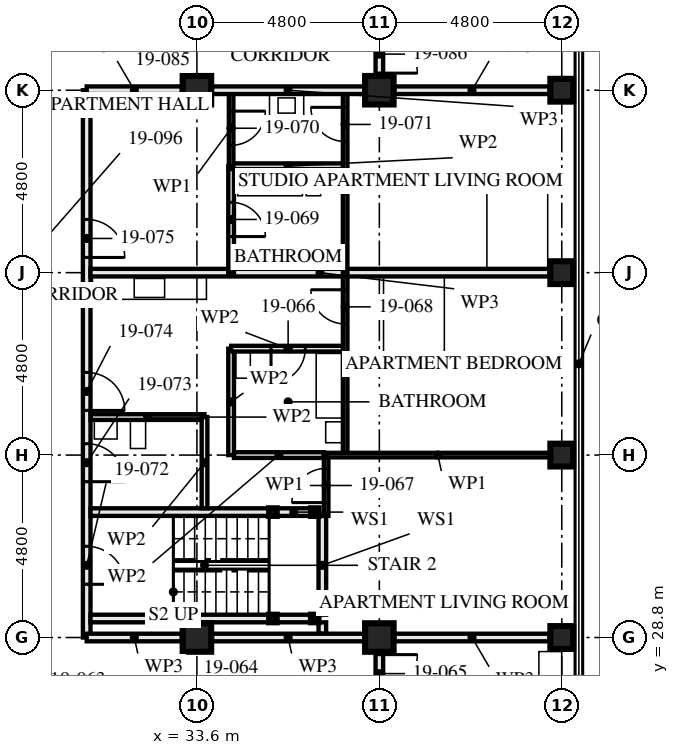
"""IFC4 building model, lengths in metres.
Left out: names, types, materials, properties, quantities, classifications, styles, units other than length and angle.
Written with IfcOpenShell. Run it as: python <this file> out.ifc"""

import sys

from ifc_helpers import new_model, si_unit, direction, frame, frame_2d, origin, origin_2d, place, context, subcontext, project, spatial, rectangle, hollow_rectangle, extrude, element, fill, save


model = new_model("IFC4")
c1 = context("Model", 3, precision=1e-05, world=origin(), true_north=direction((0.0, 1.0)))
c2 = subcontext(c1, "Body", "Model", "MODEL_VIEW")
j1 = project(units=[si_unit("LENGTHUNIT", "METRE"), si_unit("PLANEANGLEUNIT", "RADIAN")], contexts=[c1])
p1 = place(None, origin())
s1 = spatial("IfcSite", under=j1, at=p1, CompositionType="ELEMENT")
p2 = place(p1, origin())
s2 = spatial("IfcBuilding", under=s1, at=p2, CompositionType="ELEMENT")
p3 = place(p2, frame((0.0, 0.0, 72.5)))
s3 = spatial("IfcBuildingStorey", under=s2, at=p3, CompositionType="ELEMENT", Elevation=72.5)
for number, where, z_axis, x_axis in (
    (1, (33.6, 28.8, 0.0), (0.0, 0.0, 1.0), (0.0, 1.0, 0.0)),
    (2, (33.6, 43.2, 0.0), (0.0, 0.0, 1.0), (0.0, 1.0, 0.0)),
    (3, (38.4, 28.8, 0.0), (0.0, 0.0, 1.0), (0.0, 1.0, 0.0)),
    (4, (38.4, 43.2, 0.0), (0.0, 0.0, 1.0), (0.0, 1.0, 0.0)),
):
    element("IfcColumn", number, at=place(p3, frame(where, z_axis=z_axis, x_axis=x_axis)), inside=s3, PredefinedType="COLUMN", context=c2, shape_type="SweptSolid", body=[
        extrude(hollow_rectangle(XDim=0.75, YDim=0.75, WallThickness=0.08, at=origin_2d()), origin(), (0.0, 0.0, 1.0), 3.5),
    ])
for number, where, z_axis, x_axis in (
    (5, (43.2, 28.8, 0.0), (0.0, 0.0, 1.0), (0.0, 1.0, 0.0)),
    (6, (43.2, 33.6, 0.0), (0.0, 0.0, 1.0), (1.0, 0.0, 0.0)),
    (7, (43.2, 38.4, 0.0), (0.0, 0.0, 1.0), (1.0, 0.0, 0.0)),
    (8, (43.2, 43.2, 0.0), (0.0, 0.0, 1.0), (0.0, 1.0, 0.0)),
):
    element("IfcColumn", number, at=place(p3, frame(where, z_axis=z_axis, x_axis=x_axis)), inside=s3, PredefinedType="COLUMN", context=c2, shape_type="SweptSolid", body=[
        extrude(hollow_rectangle(XDim=0.6, YDim=0.6, WallThickness=0.08, at=origin_2d()), origin(), (0.0, 0.0, 1.0), 3.5),
    ])
for number, where, z_axis, x_axis in (
    (9, (36.7, 29.3, 0.0), (0.0, 0.0, 1.0), (1.0, 0.0, 0.0)),
    (10, (36.7, 32.1, 0.0), (0.0, 0.0, 1.0), (1.0, 0.0, 0.0)),
    (11, (35.6, 29.3, 0.0), (0.0, 0.0, 1.0), (1.0, 0.0, 0.0)),
    (12, (35.6, 32.1, 0.0), (0.0, 0.0, 1.0), (1.0, 0.0, 0.0)),
):
    element("IfcColumn", number, at=place(p3, frame(where, z_axis=z_axis, x_axis=x_axis)), inside=s3, PredefinedType="COLUMN", context=c2, shape_type="SweptSolid", body=[
        extrude(hollow_rectangle(XDim=0.2, YDim=0.2, WallThickness=0.008, at=origin_2d()), origin(), (0.0, 0.0, 1.0), 3.33),
    ])
p4 = place(p3, frame((38.4, 26.8, 0.0), z_axis=(0.0, 0.0, 1.0), x_axis=(0.0, 1.0, 0.0)))
e13 = element("IfcWall", 13, at=p4, inside=s3, PredefinedType="PARTITIONING", context=c2, shape_type="SweptSolid", body=[
    extrude(rectangle(XDim=1.605, YDim=0.2, at=frame_2d((0.802, 0.0))), origin(), (0.0, 0.0, 1.0), 3.33),
])
p5 = place(p4, frame((0.55, 0.0, 0.0)))
e14 = element("IfcOpeningElement", 14, at=p5, cuts=e13, PredefinedType="OPENING", context=c2, shape_type="SweptSolid", body=[
    extrude(rectangle(XDim=1.0, YDim=2.1, at=frame_2d((0.5, 1.05))), frame((0.0, 0.111, 0.0), z_axis=(0.0, -1.0, 0.0), x_axis=(1.0, 0.0, 0.0)), (0.0, 0.0, 1.0), 0.221),
])
p6 = place(p3, frame((36.6, 29.3, 0.0), z_axis=(0.0, 0.0, 1.0), x_axis=(-1.0, 0.0, 0.0)))
e15 = element("IfcWall", 15, at=p6, inside=s3, PredefinedType="SOLIDWALL", context=c2, shape_type="SweptSolid", body=[
    extrude(rectangle(XDim=0.9, YDim=0.2, at=frame_2d((0.45, 0.0))), origin(), (0.0, 0.0, 1.0), 2.99),
])
p7 = place(p3, frame((35.5, 29.3, 0.0), z_axis=(0.0, 0.0, 1.0), x_axis=(-1.0, 0.0, 0.0)))
e16 = element("IfcWall", 16, at=p7, inside=s3, PredefinedType="SOLIDWALL", context=c2, shape_type="SweptSolid", body=[
    extrude(rectangle(XDim=4.7, YDim=0.2, at=frame_2d((2.35, 0.0))), origin(), (0.0, 0.0, 1.0), 2.99),
])
p8 = place(p3, frame((36.6, 32.1, 0.0), z_axis=(0.0, 0.0, 1.0), x_axis=(-1.0, 0.0, 0.0)))
e17 = element("IfcWall", 17, at=p8, inside=s3, PredefinedType="SOLIDWALL", context=c2, shape_type="SweptSolid", body=[
    extrude(rectangle(XDim=0.9, YDim=0.2, at=frame_2d((0.45, 0.0))), origin(), (0.0, 0.0, 1.0), 2.99),
])
p9 = place(p3, frame((35.5, 32.1, 0.0), z_axis=(0.0, 0.0, 1.0), x_axis=(-1.0, 0.0, 0.0)))
e18 = element("IfcWall", 18, at=p9, inside=s3, PredefinedType="SOLIDWALL", context=c2, shape_type="SweptSolid", body=[
    extrude(rectangle(XDim=4.7, YDim=0.2, at=frame_2d((2.35, 0.0))), origin(), (0.0, 0.0, 1.0), 2.99),
])
p10 = place(p3, frame((36.9, 28.9, 0.0), z_axis=(0.0, 0.0, 1.0), x_axis=(0.0, 1.0, 0.0)))
e19 = element("IfcWall", 19, at=p10, inside=s3, PredefinedType="SOLIDWALL", context=c2, shape_type="SweptSolid", body=[
    extrude(rectangle(XDim=0.3, YDim=0.2, at=frame_2d((0.15, 0.0))), origin(), (0.0, 0.0, 1.0), 3.33),
])
p11 = place(p3, frame((36.9, 29.4, 0.0), z_axis=(0.0, 0.0, 1.0), x_axis=(0.0, 1.0, 0.0)))
e20 = element("IfcWall", 20, at=p11, inside=s3, PredefinedType="SOLIDWALL", context=c2, shape_type="SweptSolid", body=[
    extrude(rectangle(XDim=2.6, YDim=0.2, at=frame_2d((1.3, 0.0))), origin(), (0.0, 0.0, 1.0), 3.33),
])
p12 = place(p3, frame((33.8, 32.2, 0.0), z_axis=(0.0, 0.0, 1.0), x_axis=(0.0, 1.0, 0.0)))
e21 = element("IfcWall", 21, at=p12, inside=s3, PredefinedType="PARTITIONING", context=c2, shape_type="SweptSolid", body=[
    extrude(rectangle(XDim=2.4, YDim=0.15, at=frame_2d((1.2, 0.0))), origin(), (0.0, 0.0, 1.0), 2.55),
])
p13 = place(p3, frame((33.8, 34.6, 0.0), z_axis=(0.0, 0.0, 1.0), x_axis=(-1.0, 0.0, 0.0)))
e22 = element("IfcWall", 22, at=p13, inside=s3, PredefinedType="PARTITIONING", context=c2, shape_type="SweptSolid", body=[
    extrude(rectangle(XDim=3.0, YDim=0.15, at=frame_2d((1.5, 0.0))), origin(), (0.0, 0.0, 1.0), 3.33),
])
p14 = place(p3, frame((37.5, 36.4, 0.0), z_axis=(0.0, 0.0, 1.0), x_axis=(-1.0, 0.0, 0.0)))
e23 = element("IfcWall", 23, at=p14, inside=s3, PredefinedType="PARTITIONING", context=c2, shape_type="SweptSolid", body=[
    extrude(rectangle(XDim=3.0, YDim=0.15, at=frame_2d((1.5, 0.0))), origin(), (0.0, 0.0, 1.0), 3.33),
])
p15 = place(p14, frame((1.05, 0.0, 0.0)))
e24 = element("IfcOpeningElement", 24, at=p15, cuts=e23, PredefinedType="OPENING", context=c2, shape_type="SweptSolid", body=[
    extrude(rectangle(XDim=0.9, YDim=2.1, at=frame_2d((0.45, 1.05))), frame((0.0, 0.085, 0.0), z_axis=(0.0, -1.0, 0.0), x_axis=(1.0, 0.0, 0.0)), (0.0, 0.0, 1.0), 0.171),
])
p16 = place(p3, frame((34.5, 33.6, 0.0), z_axis=(0.0, 0.0, 1.0), x_axis=(0.0, 1.0, 0.0)))
e25 = element("IfcWall", 25, at=p16, inside=s3, PredefinedType="PARTITIONING", context=c2, shape_type="SweptSolid", body=[
    extrude(rectangle(XDim=2.8, YDim=0.15, at=frame_2d((1.4, 0.0))), origin(), (0.0, 0.0, 1.0), 3.33),
])
p17 = place(p3, frame((37.0, 32.0, 0.0), z_axis=(0.0, 0.0, 1.0), x_axis=(0.0, 1.0, 0.0)))
e26 = element("IfcWall", 26, at=p17, inside=s3, PredefinedType="PARTITIONING", context=c2, shape_type="SweptSolid", body=[
    extrude(rectangle(XDim=1.6, YDim=0.12, at=frame_2d((0.8, 0.0))), origin(), (0.0, 0.0, 1.0), 3.33),
])
p18 = place(p17, frame((0.35, 0.0, 0.0)))
e27 = element("IfcOpeningElement", 27, at=p18, cuts=e26, PredefinedType="OPENING", context=c2, shape_type="SweptSolid", body=[
    extrude(rectangle(XDim=0.9, YDim=2.1, at=frame_2d((0.45, 1.05))), frame((0.0, 0.071, 0.0), z_axis=(0.0, -1.0, 0.0), x_axis=(1.0, 0.0, 0.0)), (0.0, 0.0, 1.0), 0.141),
])
p19 = place(p3, frame((37.5, 33.6, 0.0), z_axis=(0.0, 0.0, 1.0), x_axis=(0.0, 1.0, 0.0)))
e28 = element("IfcWall", 28, at=p19, inside=s3, PredefinedType="PARTITIONING", context=c2, shape_type="SweptSolid", body=[
    extrude(rectangle(XDim=4.8, YDim=0.12, at=frame_2d((2.4, 0.0))), origin(), (0.0, 0.0, 1.0), 3.33),
])
p20 = place(p19, frame((3.45, 0.0, 0.0)))
e29 = element("IfcOpeningElement", 29, at=p20, cuts=e28, PredefinedType="OPENING", context=c2, shape_type="SweptSolid", body=[
    extrude(rectangle(XDim=0.9, YDim=2.1, at=frame_2d((0.45, 1.05))), frame((0.0, 0.071, 0.0), z_axis=(0.0, -1.0, 0.0), x_axis=(1.0, 0.0, 0.0)), (0.0, 0.0, 1.0), 0.141),
])
p21 = place(p3, frame((42.88, 33.6, 0.0), z_axis=(0.0, 0.0, 1.0), x_axis=(-1.0, 0.0, 0.0)))
e30 = element("IfcWall", 30, at=p21, inside=s3, PredefinedType="PARTITIONING", context=c2, shape_type="SweptSolid", body=[
    extrude(rectangle(XDim=5.88, YDim=0.12, at=frame_2d((2.94, 0.0))), origin(), (0.0, 0.0, 1.0), 2.55),
])
p22 = place(p3, frame((42.88, 38.4, 0.0), z_axis=(0.0, 0.0, 1.0), x_axis=(-1.0, 0.0, 0.0)))
e31 = element("IfcWall", 31, at=p22, inside=s3, PredefinedType="PARTITIONING", context=c2, shape_type="SweptSolid", body=[
    extrude(rectangle(XDim=12.08, YDim=0.2, at=frame_2d((6.04, 0.0))), origin(), (0.0, 0.0, 1.0), 2.55),
])
p23 = place(p3, frame((37.5, 41.2, 0.0), z_axis=(0.0, 0.0, 1.0), x_axis=(-1.0, 0.0, 0.0)))
e32 = element("IfcWall", 32, at=p23, inside=s3, PredefinedType="PARTITIONING", context=c2, shape_type="SweptSolid", body=[
    extrude(rectangle(XDim=3.0, YDim=0.15, at=frame_2d((1.5, 0.0))), origin(), (0.0, 0.0, 1.0), 3.33),
])
p24 = place(p3, frame((34.5, 38.4, 0.0), z_axis=(0.0, 0.0, 1.0), x_axis=(0.0, 1.0, 0.0)))
e33 = element("IfcWall", 33, at=p24, inside=s3, PredefinedType="PARTITIONING", context=c2, shape_type="SweptSolid", body=[
    extrude(rectangle(XDim=2.8, YDim=0.15, at=frame_2d((1.4, 0.0))), origin(), (0.0, 0.0, 1.0), 3.33),
])
p25 = place(p24, frame((0.95, 0.0, 0.0)))
e34 = element("IfcOpeningElement", 34, at=p25, cuts=e33, PredefinedType="OPENING", context=c2, shape_type="SweptSolid", body=[
    extrude(rectangle(XDim=0.9, YDim=2.1, at=frame_2d((0.45, 1.05))), frame((0.0, 0.085, 0.0), z_axis=(0.0, -1.0, 0.0), x_axis=(1.0, 0.0, 0.0)), (0.0, 0.0, 1.0), 0.171),
])
p26 = place(p3, frame((34.5, 41.2, 0.0), z_axis=(0.0, 0.0, 1.0), x_axis=(0.0, 1.0, 0.0)))
e35 = element("IfcWall", 35, at=p26, inside=s3, PredefinedType="PARTITIONING", context=c2, shape_type="SweptSolid", body=[
    extrude(rectangle(XDim=2.0, YDim=0.12, at=frame_2d((1.0, 0.0))), origin(), (0.0, 0.0, 1.0), 3.33),
])
p27 = place(p26, frame((0.55, 0.0, 0.0)))
e36 = element("IfcOpeningElement", 36, at=p27, cuts=e35, PredefinedType="OPENING", context=c2, shape_type="SweptSolid", body=[
    extrude(rectangle(XDim=0.9, YDim=2.1, at=frame_2d((0.45, 1.05))), frame((0.0, 0.071, 0.0), z_axis=(0.0, -1.0, 0.0), x_axis=(1.0, 0.0, 0.0)), (0.0, 0.0, 1.0), 0.141),
])
p28 = place(p3, frame((37.5, 38.4, 0.0), z_axis=(0.0, 0.0, 1.0), x_axis=(0.0, 1.0, 0.0)))
e37 = element("IfcWall", 37, at=p28, inside=s3, PredefinedType="PARTITIONING", context=c2, shape_type="SweptSolid", body=[
    extrude(rectangle(XDim=4.8, YDim=0.12, at=frame_2d((2.4, 0.0))), origin(), (0.0, 0.0, 1.0), 3.33),
])
p29 = place(p28, frame((3.45, 0.0, 0.0)))
e38 = element("IfcOpeningElement", 38, at=p29, cuts=e37, PredefinedType="OPENING", context=c2, shape_type="SweptSolid", body=[
    extrude(rectangle(XDim=0.9, YDim=2.1, at=frame_2d((0.45, 1.05))), frame((0.0, 0.071, 0.0), z_axis=(0.0, -1.0, 0.0), x_axis=(1.0, 0.0, 0.0)), (0.0, 0.0, 1.0), 0.141),
])
p30 = place(p3, frame((30.7, 28.8, 0.0), z_axis=(0.0, 0.0, 1.0), x_axis=(0.0, 1.0, 0.0)))
e39 = element("IfcWall", 39, at=p30, inside=s3, PredefinedType="PARTITIONING", context=c2, shape_type="SweptSolid", body=[
    extrude(rectangle(XDim=14.4, YDim=0.2, at=frame_2d((7.2, 0.0))), origin(), (0.0, 0.0, 1.0), 2.55),
])
p31 = place(p30, frame((1.4, 0.0, 0.0)))
e40 = element("IfcOpeningElement", 40, at=p31, cuts=e39, PredefinedType="OPENING", context=c2, shape_type="SweptSolid", body=[
    extrude(rectangle(XDim=1.0, YDim=2.1, at=frame_2d((0.5, 1.05))), frame((0.0, 0.111, 0.0), z_axis=(0.0, -1.0, 0.0), x_axis=(1.0, 0.0, 0.0)), (0.0, 0.0, 1.0), 0.221),
])
p32 = place(p30, frame((4.1, 0.0, 0.0)))
e41 = element("IfcOpeningElement", 41, at=p32, cuts=e39, PredefinedType="OPENING", context=c2, shape_type="SweptSolid", body=[
    extrude(rectangle(XDim=1.0, YDim=2.1, at=frame_2d((0.5, 1.05))), frame((0.0, 0.111, 0.0), z_axis=(0.0, -1.0, 0.0), x_axis=(1.0, 0.0, 0.0)), (0.0, 0.0, 1.0), 0.221),
])
p33 = place(p30, frame((5.975, 0.0, 0.0)))
e42 = element("IfcOpeningElement", 42, at=p33, cuts=e39, PredefinedType="OPENING", context=c2, shape_type="SweptSolid", body=[
    extrude(rectangle(XDim=1.0, YDim=2.1, at=frame_2d((0.5, 1.05))), frame((0.0, 0.111, 0.0), z_axis=(0.0, -1.0, 0.0), x_axis=(1.0, 0.0, 0.0)), (0.0, 0.0, 1.0), 0.221),
])
p34 = place(p30, frame((10.0, 0.0, 0.0)))
e43 = element("IfcOpeningElement", 43, at=p34, cuts=e39, PredefinedType="OPENING", context=c2, shape_type="SweptSolid", body=[
    extrude(rectangle(XDim=1.0, YDim=2.1, at=frame_2d((0.5, 1.05))), frame((0.0, 0.111, 0.0), z_axis=(0.0, -1.0, 0.0), x_axis=(1.0, 0.0, 0.0)), (0.0, 0.0, 1.0), 0.221),
])
p35 = place(p3, frame((38.4, 45.2, 0.0), z_axis=(0.0, 0.0, 1.0), x_axis=(0.0, -1.0, 0.0)))
e44 = element("IfcWall", 44, at=p35, inside=s3, PredefinedType="PARTITIONING", context=c2, shape_type="SweptSolid", body=[
    extrude(rectangle(XDim=1.605, YDim=0.2, at=frame_2d((0.802, 0.0))), origin(), (0.0, 0.0, 1.0), 3.33),
])
p36 = place(p35, frame((0.55, 0.0, 0.0)))
e45 = element("IfcOpeningElement", 45, at=p36, cuts=e44, PredefinedType="OPENING", context=c2, shape_type="SweptSolid", body=[
    extrude(rectangle(XDim=1.0, YDim=2.1, at=frame_2d((0.5, 1.05))), frame((0.0, 0.111, 0.0), z_axis=(0.0, -1.0, 0.0), x_axis=(1.0, 0.0, 0.0)), (0.0, 0.0, 1.0), 0.221),
])
p37 = place(p3, frame((42.88, 28.8, 0.0), z_axis=(0.0, 0.0, 1.0), x_axis=(-1.0, 0.0, 0.0)))
e46 = element("IfcWall", 46, at=p37, inside=s3, PredefinedType="PARTITIONING", context=c2, shape_type="SweptSolid", body=[
    extrude(rectangle(XDim=4.085, YDim=0.2, at=frame_2d((2.042, 0.0))), origin(), (0.0, 0.0, 1.0), 2.32),
])
p38 = place(p3, frame((38.005, 28.8, 0.0), z_axis=(0.0, 0.0, 1.0), x_axis=(-1.0, 0.0, 0.0)))
e47 = element("IfcWall", 47, at=p38, inside=s3, PredefinedType="PARTITIONING", context=c2, shape_type="SweptSolid", body=[
    extrude(rectangle(XDim=4.01, YDim=0.2, at=frame_2d((2.005, 0.0))), origin(), (0.0, 0.0, 1.0), 2.32),
])
p39 = place(p3, frame((33.205, 28.8, 0.0), z_axis=(0.0, 0.0, 1.0), x_axis=(-1.0, 0.0, 0.0)))
e48 = element("IfcWall", 48, at=p39, inside=s3, PredefinedType="PARTITIONING", context=c2, shape_type="SweptSolid", body=[
    extrude(rectangle(XDim=2.505, YDim=0.2, at=frame_2d((1.252, 0.0))), origin(), (0.0, 0.0, 1.0), 2.32),
])
p40 = place(p3, frame((42.88, 43.2, 0.0), z_axis=(0.0, 0.0, 1.0), x_axis=(-1.0, 0.0, 0.0)))
e49 = element("IfcWall", 49, at=p40, inside=s3, PredefinedType="PARTITIONING", context=c2, shape_type="SweptSolid", body=[
    extrude(rectangle(XDim=4.085, YDim=0.2, at=frame_2d((2.042, 0.0))), origin(), (0.0, 0.0, 1.0), 2.32),
])
p41 = place(p3, frame((38.005, 43.2, 0.0), z_axis=(0.0, 0.0, 1.0), x_axis=(-1.0, 0.0, 0.0)))
e50 = element("IfcWall", 50, at=p41, inside=s3, PredefinedType="PARTITIONING", context=c2, shape_type="SweptSolid", body=[
    extrude(rectangle(XDim=4.01, YDim=0.2, at=frame_2d((2.005, 0.0))), origin(), (0.0, 0.0, 1.0), 2.32),
])
p42 = place(p3, frame((33.205, 43.2, 0.0), z_axis=(0.0, 0.0, 1.0), x_axis=(-1.0, 0.0, 0.0)))
e51 = element("IfcWall", 51, at=p42, inside=s3, PredefinedType="PARTITIONING", context=c2, shape_type="SweptSolid", body=[
    extrude(rectangle(XDim=2.505, YDim=0.2, at=frame_2d((1.252, 0.0))), origin(), (0.0, 0.0, 1.0), 2.32),
])
p43 = place(p3, frame((36.94, 33.6, 0.0), z_axis=(0.0, 0.0, 1.0), x_axis=(-1.0, 0.0, 0.0)))
e52 = element("IfcWall", 52, at=p43, inside=s3, PredefinedType="PARTITIONING", context=c2, shape_type="SweptSolid", body=[
    extrude(rectangle(XDim=2.365, YDim=0.15, at=frame_2d((1.183, 0.0))), origin(), (0.0, 0.0, 1.0), 2.55),
])
p44 = place(p5, frame((1.0, 0.0, 0.0), z_axis=(0.0, 0.0, 1.0), x_axis=(-1.0, 0.0, 0.0)))
e53 = element("IfcDoor", 53, at=p44, inside=s3, OperationType="SINGLE_SWING_RIGHT", PredefinedType="DOOR", context=c2, shape_type="SweptSolid", body=[
    extrude(rectangle(XDim=1.0, YDim=2.1, at=frame_2d((0.5, 1.05))), frame((0.0, 0.027, 0.0), z_axis=(0.0, -1.0, 0.0), x_axis=(1.0, 0.0, 0.0)), (0.0, 0.0, 1.0), 0.054),
])
fill(e14, e53)
p45 = place(p15, origin())
e54 = element("IfcDoor", 54, at=p45, inside=s3, OperationType="SINGLE_SWING_LEFT", PredefinedType="DOOR", context=c2, shape_type="SweptSolid", body=[
    extrude(rectangle(XDim=0.9, YDim=2.1, at=frame_2d((0.45, 1.05))), frame((0.0, 0.022, 0.0), z_axis=(0.0, -1.0, 0.0), x_axis=(1.0, 0.0, 0.0)), (0.0, 0.0, 1.0), 0.044),
])
fill(e24, e54)
p46 = place(p18, origin())
e55 = element("IfcDoor", 55, at=p46, inside=s3, OperationType="SINGLE_SWING_RIGHT", PredefinedType="DOOR", context=c2, shape_type="SweptSolid", body=[
    extrude(rectangle(XDim=0.9, YDim=2.1, at=frame_2d((0.45, 1.05))), frame((0.0, 0.022, 0.0), z_axis=(0.0, -1.0, 0.0), x_axis=(1.0, 0.0, 0.0)), (0.0, 0.0, 1.0), 0.044),
])
fill(e27, e55)
p47 = place(p20, origin())
e56 = element("IfcDoor", 56, at=p47, inside=s3, OperationType="SINGLE_SWING_LEFT", PredefinedType="DOOR", context=c2, shape_type="SweptSolid", body=[
    extrude(rectangle(XDim=0.9, YDim=2.1, at=frame_2d((0.45, 1.05))), frame((0.0, 0.022, 0.0), z_axis=(0.0, -1.0, 0.0), x_axis=(1.0, 0.0, 0.0)), (0.0, 0.0, 1.0), 0.044),
])
fill(e29, e56)
p48 = place(p25, frame((0.9, 0.0, 0.0), z_axis=(0.0, 0.0, 1.0), x_axis=(-1.0, 0.0, 0.0)))
e57 = element("IfcDoor", 57, at=p48, inside=s3, OperationType="SINGLE_SWING_LEFT", PredefinedType="DOOR", context=c2, shape_type="SweptSolid", body=[
    extrude(rectangle(XDim=0.9, YDim=2.1, at=frame_2d((0.45, 1.05))), frame((0.0, 0.022, 0.0), z_axis=(0.0, -1.0, 0.0), x_axis=(1.0, 0.0, 0.0)), (0.0, 0.0, 1.0), 0.044),
])
fill(e34, e57)
p49 = place(p27, frame((0.9, 0.0, 0.0), z_axis=(0.0, 0.0, 1.0), x_axis=(-1.0, 0.0, 0.0)))
e58 = element("IfcDoor", 58, at=p49, inside=s3, OperationType="SINGLE_SWING_RIGHT", PredefinedType="DOOR", context=c2, shape_type="SweptSolid", body=[
    extrude(rectangle(XDim=0.9, YDim=2.1, at=frame_2d((0.45, 1.05))), frame((0.0, 0.022, 0.0), z_axis=(0.0, -1.0, 0.0), x_axis=(1.0, 0.0, 0.0)), (0.0, 0.0, 1.0), 0.044),
])
fill(e36, e58)
p50 = place(p29, origin())
e59 = element("IfcDoor", 59, at=p50, inside=s3, OperationType="SINGLE_SWING_LEFT", PredefinedType="DOOR", context=c2, shape_type="SweptSolid", body=[
    extrude(rectangle(XDim=0.9, YDim=2.1, at=frame_2d((0.45, 1.05))), frame((0.0, 0.022, 0.0), z_axis=(0.0, -1.0, 0.0), x_axis=(1.0, 0.0, 0.0)), (0.0, 0.0, 1.0), 0.044),
])
fill(e38, e59)
p51 = place(p31, frame((1.0, 0.0, 0.0), z_axis=(0.0, 0.0, 1.0), x_axis=(-1.0, 0.0, 0.0)))
e60 = element("IfcDoor", 60, at=p51, inside=s3, OperationType="SINGLE_SWING_LEFT", PredefinedType="DOOR", context=c2, shape_type="SweptSolid", body=[
    extrude(rectangle(XDim=1.0, YDim=2.1, at=frame_2d((0.5, 1.05))), frame((0.0, 0.032, 0.0), z_axis=(0.0, -1.0, 0.0), x_axis=(1.0, 0.0, 0.0)), (0.0, 0.0, 1.0), 0.064),
])
fill(e40, e60)
p52 = place(p32, frame((1.0, 0.0, 0.0), z_axis=(0.0, 0.0, 1.0), x_axis=(-1.0, 0.0, 0.0)))
e61 = element("IfcDoor", 61, at=p52, inside=s3, OperationType="SINGLE_SWING_LEFT", PredefinedType="DOOR", context=c2, shape_type="SweptSolid", body=[
    extrude(rectangle(XDim=1.0, YDim=2.1, at=frame_2d((0.5, 1.05))), frame((0.0, 0.027, 0.0), z_axis=(0.0, -1.0, 0.0), x_axis=(1.0, 0.0, 0.0)), (0.0, 0.0, 1.0), 0.054),
])
fill(e41, e61)
p53 = place(p33, frame((1.0, 0.0, 0.0), z_axis=(0.0, 0.0, 1.0), x_axis=(-1.0, 0.0, 0.0)))
e62 = element("IfcDoor", 62, at=p53, inside=s3, OperationType="SINGLE_SWING_LEFT", PredefinedType="DOOR", context=c2, shape_type="SweptSolid", body=[
    extrude(rectangle(XDim=1.0, YDim=2.1, at=frame_2d((0.5, 1.05))), frame((0.0, 0.027, 0.0), z_axis=(0.0, -1.0, 0.0), x_axis=(1.0, 0.0, 0.0)), (0.0, 0.0, 1.0), 0.054),
])
fill(e42, e62)
p54 = place(p34, frame((1.0, 0.0, 0.0), z_axis=(0.0, 0.0, 1.0), x_axis=(-1.0, 0.0, 0.0)))
e63 = element("IfcDoor", 63, at=p54, inside=s3, OperationType="SINGLE_SWING_LEFT", PredefinedType="DOOR", context=c2, shape_type="SweptSolid", body=[
    extrude(rectangle(XDim=1.0, YDim=2.1, at=frame_2d((0.5, 1.05))), frame((0.0, 0.027, 0.0), z_axis=(0.0, -1.0, 0.0), x_axis=(1.0, 0.0, 0.0)), (0.0, 0.0, 1.0), 0.054),
])
fill(e43, e63)
p55 = place(p36, origin())
e64 = element("IfcDoor", 64, at=p55, inside=s3, OperationType="SINGLE_SWING_LEFT", PredefinedType="DOOR", context=c2, shape_type="SweptSolid", body=[
    extrude(rectangle(XDim=1.0, YDim=2.1, at=frame_2d((0.5, 1.05))), frame((0.0, 0.027, 0.0), z_axis=(0.0, -1.0, 0.0), x_axis=(1.0, 0.0, 0.0)), (0.0, 0.0, 1.0), 0.054),
])
fill(e45, e64)
save(model, sys.argv[1])
